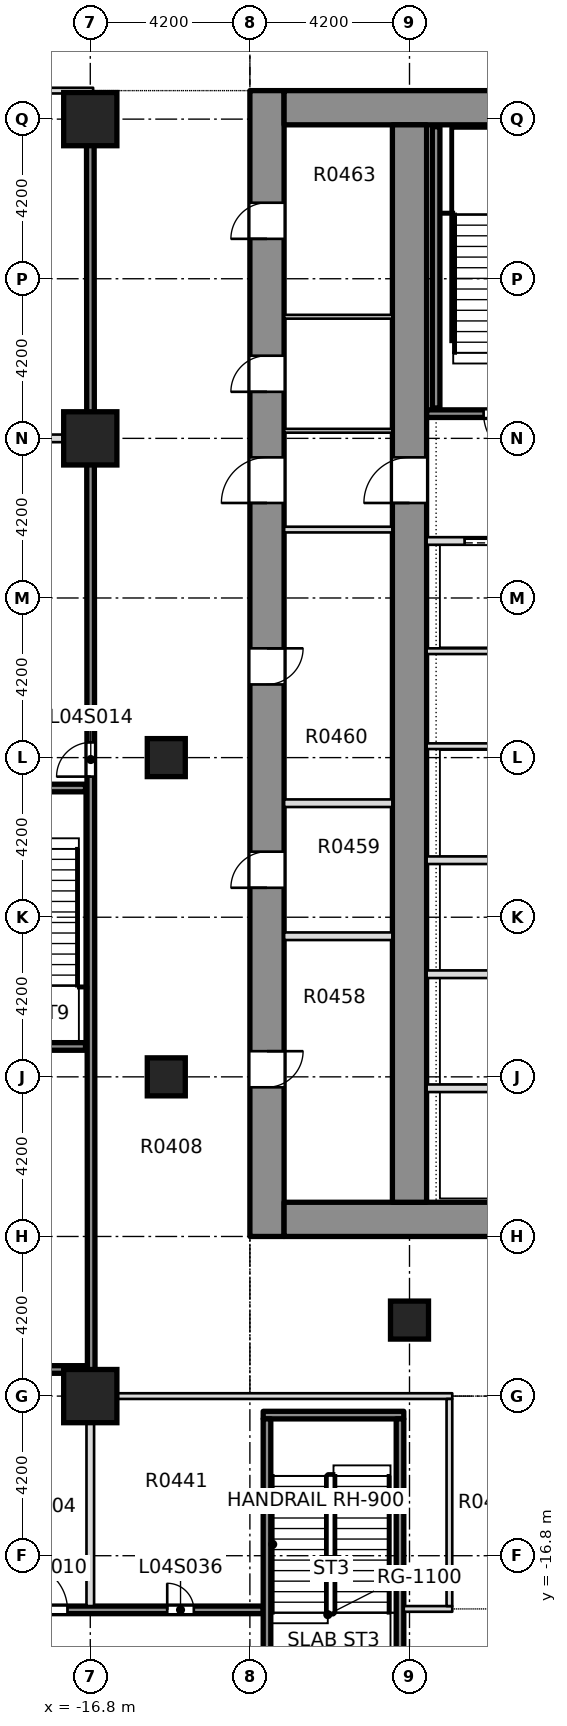
"""IFC4 building model, lengths in metres.
Left out: names, types, materials, properties, quantities, classifications, styles, units other than length and angle.
Written with IfcOpenShell. Run it as: python <this file> out.ifc"""

import sys

from ifc_helpers import new_model, si_unit, direction, frame, frame_2d, origin, origin_2d, place, context, subcontext, project, spatial, rectangle, extrude, element, fill, save


model = new_model("IFC4")
c1 = context("Model", 3, precision=1e-05, world=origin(), true_north=direction((0.0, 1.0)))
c2 = subcontext(c1, "Body", "Model", "MODEL_VIEW")
j1 = project(units=[si_unit("LENGTHUNIT", "METRE"), si_unit("PLANEANGLEUNIT", "RADIAN")], contexts=[c1])
p1 = place(None, origin())
s1 = spatial("IfcSite", under=j1, at=p1, CompositionType="ELEMENT")
p2 = place(p1, origin())
s2 = spatial("IfcBuilding", under=s1, at=p2, CompositionType="ELEMENT")
p3 = place(p2, frame((0.0, 0.0, 25.0)))
s3 = spatial("IfcBuildingStorey", under=s2, at=p3, CompositionType="ELEMENT", Elevation=25.0)
p4 = place(p3, frame((-12.15, -8.4, -0.4), z_axis=(0.0, 0.0, 1.0), x_axis=(0.0, 1.0, 0.0)))
e1 = element("IfcWall", 1, at=p4, inside=s3, PredefinedType="SHEAR", context=c2, shape_type="SweptSolid", body=[
    extrude(rectangle(XDim=30.15, YDim=0.9, at=frame_2d((15.075, 0.0))), origin(), (0.0, 0.0, 1.0), 5.0),
])
p5 = place(p4, frame((3.925, 0.0, 0.4)))
e2 = element("IfcOpeningElement", 2, at=p5, cuts=e1, PredefinedType="OPENING", context=c2, shape_type="SweptSolid", body=[
    extrude(rectangle(XDim=0.95, YDim=2.1, at=frame_2d((0.475, 1.05))), frame((0.0, 0.46, 0.0), z_axis=(0.0, -1.0, 0.0), x_axis=(1.0, 0.0, 0.0)), (0.0, 0.0, 1.0), 0.92),
])
p6 = place(p4, frame((9.175, 0.0, 0.4)))
e3 = element("IfcOpeningElement", 3, at=p6, cuts=e1, PredefinedType="OPENING", context=c2, shape_type="SweptSolid", body=[
    extrude(rectangle(XDim=0.95, YDim=2.1, at=frame_2d((0.475, 1.05))), frame((0.0, 0.46, 0.0), z_axis=(0.0, -1.0, 0.0), x_axis=(1.0, 0.0, 0.0)), (0.0, 0.0, 1.0), 0.92),
])
p7 = place(p4, frame((14.525, 0.0, 0.4)))
e4 = element("IfcOpeningElement", 4, at=p7, cuts=e1, PredefinedType="OPENING", context=c2, shape_type="SweptSolid", body=[
    extrude(rectangle(XDim=0.95, YDim=2.1, at=frame_2d((0.475, 1.05))), frame((0.0, 0.46, 0.0), z_axis=(0.0, -1.0, 0.0), x_axis=(1.0, 0.0, 0.0)), (0.0, 0.0, 1.0), 0.92),
])
p8 = place(p4, frame((22.225, 0.0, 0.4)))
e5 = element("IfcOpeningElement", 5, at=p8, cuts=e1, PredefinedType="OPENING", context=c2, shape_type="SweptSolid", body=[
    extrude(rectangle(XDim=0.95, YDim=2.1, at=frame_2d((0.475, 1.05))), frame((0.0, 0.46, 0.0), z_axis=(0.0, -1.0, 0.0), x_axis=(1.0, 0.0, 0.0)), (0.0, 0.0, 1.0), 0.92),
])
p9 = place(p4, frame((26.25, 0.0, 0.4)))
e6 = element("IfcOpeningElement", 6, at=p9, cuts=e1, PredefinedType="OPENING", context=c2, shape_type="SweptSolid", body=[
    extrude(rectangle(XDim=0.95, YDim=2.1, at=frame_2d((0.475, 1.05))), frame((0.0, 0.46, 0.0), z_axis=(0.0, -1.0, 0.0), x_axis=(1.0, 0.0, 0.0)), (0.0, 0.0, 1.0), 0.92),
])
p10 = place(p4, frame((19.3, 0.0, 0.4)))
e7 = element("IfcOpeningElement", 7, at=p10, cuts=e1, PredefinedType="OPENING", context=c2, shape_type="SweptSolid", body=[
    extrude(rectangle(XDim=1.2, YDim=2.1, at=frame_2d((0.6, 1.05))), frame((0.0, 0.46, 0.0), z_axis=(0.0, -1.0, 0.0), x_axis=(1.0, 0.0, 0.0)), (0.0, 0.0, 1.0), 0.92),
])
p11 = place(p3, frame((-11.7, -7.95, -0.4), z_axis=(0.0, 0.0, 1.0), x_axis=(1.0, 0.0, 0.0)))
e8 = element("IfcWall", 8, at=p11, inside=s3, PredefinedType="SHEAR", context=c2, shape_type="SweptSolid", body=[
    extrude(rectangle(XDim=23.4, YDim=0.9, at=frame_2d((11.7, 0.0))), origin(), (0.0, 0.0, 1.0), 5.0),
])
p12 = place(p11, frame((6.95, 0.0, 0.4)))
e9 = element("IfcOpeningElement", 9, at=p12, cuts=e8, PredefinedType="OPENING", context=c2, shape_type="SweptSolid", body=[
    extrude(rectangle(XDim=1.8, YDim=2.1, at=frame_2d((0.9, 1.05))), frame((0.0, 0.46, 0.0), z_axis=(0.0, -1.0, 0.0), x_axis=(1.0, 0.0, 0.0)), (0.0, 0.0, 1.0), 0.92),
])
p13 = place(p11, frame((14.65, 0.0, 0.4)))
e10 = element("IfcOpeningElement", 10, at=p13, cuts=e8, PredefinedType="OPENING", context=c2, shape_type="SweptSolid", body=[
    extrude(rectangle(XDim=1.8, YDim=2.1, at=frame_2d((0.9, 1.05))), frame((0.0, 0.46, 0.0), z_axis=(0.0, -1.0, 0.0), x_axis=(1.0, 0.0, 0.0)), (0.0, 0.0, 1.0), 0.92),
])
p14 = place(p3, frame((-11.7, 21.3, -0.4), z_axis=(0.0, 0.0, 1.0), x_axis=(1.0, 0.0, 0.0)))
e11 = element("IfcWall", 11, at=p14, inside=s3, PredefinedType="SOLIDWALL", context=c2, shape_type="SweptSolid", body=[
    extrude(rectangle(XDim=23.4, YDim=0.9, at=frame_2d((11.7, 0.0))), origin(), (0.0, 0.0, 1.0), 5.0),
])
p15 = place(p3, frame((-8.4, -7.5, -0.4), z_axis=(0.0, 0.0, 1.0), x_axis=(0.0, 1.0, 0.0)))
e12 = element("IfcWall", 12, at=p15, inside=s3, PredefinedType="SHEAR", context=c2, shape_type="SweptSolid", body=[
    extrude(rectangle(XDim=28.35, YDim=0.9, at=frame_2d((14.175, 0.0))), origin(), (0.0, 0.0, 1.0), 5.0),
])
p16 = place(p15, frame((18.4, 0.0, 0.4)))
e13 = element("IfcOpeningElement", 13, at=p16, cuts=e12, PredefinedType="OPENING", context=c2, shape_type="SweptSolid", body=[
    extrude(rectangle(XDim=1.2, YDim=2.1, at=frame_2d((0.6, 1.05))), frame((0.0, 0.46, 0.0), z_axis=(0.0, -1.0, 0.0), x_axis=(1.0, 0.0, 0.0)), (0.0, 0.0, 1.0), 0.92),
])
for number, where, z_axis, x_axis in (
    (14, (-16.8, -12.6, -0.4), (0.0, 0.0, 1.0), (1.0, 0.0, 0.0)),
    (15, (-16.8, 12.6, -0.4), (0.0, 0.0, 1.0), (1.0, 0.0, 0.0)),
    (16, (-16.8, 21.0, -0.4), (0.0, 0.0, 1.0), (1.0, 0.0, 0.0)),
):
    element("IfcColumn", number, at=place(p3, frame(where, z_axis=z_axis, x_axis=x_axis)), inside=s3, PredefinedType="COLUMN", context=c2, shape_type="SweptSolid", body=[
        extrude(rectangle(XDim=1.4, YDim=1.4, at=origin_2d()), origin(), (0.0, 0.0, 1.0), 5.0),
    ])
for number, where, z_axis, x_axis in (
    (17, (-8.4, -10.6, -0.4), (0.0, 0.0, 1.0), (1.0, 0.0, 0.0)),
    (18, (-14.8, -4.2, -0.4), (0.0, 0.0, 1.0), (1.0, 0.0, 0.0)),
    (19, (-14.8, 4.2, -0.4), (0.0, 0.0, 1.0), (1.0, 0.0, 0.0)),
):
    element("IfcColumn", number, at=place(p3, frame(where, z_axis=z_axis, x_axis=x_axis)), inside=s3, PredefinedType="COLUMN", context=c2, shape_type="SweptSolid", body=[
        extrude(rectangle(XDim=1.0, YDim=1.0, at=origin_2d()), origin(), (0.0, 0.0, 1.0), 5.0),
    ])
p17 = place(p3, frame((-25.2, -18.225, 0.0), z_axis=(0.0, 0.0, 1.0), x_axis=(1.0, 0.0, 0.0)))
e20 = element("IfcWall", 20, at=p17, inside=s3, PredefinedType="SOLIDWALL", context=c2, shape_type="SweptSolid", body=[
    extrude(rectangle(XDim=12.95, YDim=0.2, at=frame_2d((6.475, 0.0))), origin(), (0.0, 0.0, 1.0), 4.6),
])
p18 = place(p17, frame((6.6, 0.0, 0.0)))
e21 = element("IfcOpeningElement", 21, at=p18, cuts=e20, PredefinedType="OPENING", context=c2, shape_type="SweptSolid", body=[
    extrude(rectangle(XDim=1.2, YDim=2.1, at=frame_2d((0.6, 1.05))), frame((0.0, 0.11, 0.0), z_axis=(0.0, -1.0, 0.0), x_axis=(1.0, 0.0, 0.0)), (0.0, 0.0, 1.0), 0.22),
])
p19 = place(p17, frame((10.425, 0.0, 0.0)))
e22 = element("IfcOpeningElement", 22, at=p19, cuts=e20, PredefinedType="OPENING", context=c2, shape_type="SweptSolid", body=[
    extrude(rectangle(XDim=0.7, YDim=2.1, at=frame_2d((0.35, 1.05))), frame((0.0, 0.11, 0.0), z_axis=(0.0, -1.0, 0.0), x_axis=(1.0, 0.0, 0.0)), (0.0, 0.0, 1.0), 0.22),
])
p20 = place(p3, frame((-8.55, -18.2, 0.0), z_axis=(0.0, 0.0, 1.0), x_axis=(1.0, 0.0, 0.0)))
e23 = element("IfcWall", 23, at=p20, inside=s3, PredefinedType="PARTITIONING", context=c2, shape_type="SweptSolid", body=[
    extrude(rectangle(XDim=1.275, YDim=0.15, at=frame_2d((0.638, 0.0))), origin(), (0.0, 0.0, 1.0), 4.6),
])
p21 = place(p3, frame((-16.9, -12.6, 0.0), z_axis=(0.0, 0.0, 1.0), x_axis=(1.0, 0.0, 0.0)))
e24 = element("IfcWall", 24, at=p21, inside=s3, PredefinedType="PARTITIONING", context=c2, shape_type="SweptSolid", body=[
    extrude(rectangle(XDim=9.625, YDim=0.15, at=frame_2d((4.812, 0.0))), origin(), (0.0, 0.0, 1.0), 4.6),
])
p22 = place(p3, frame((-25.2, -11.9, 0.0), z_axis=(0.0, 0.0, 1.0), x_axis=(1.0, 0.0, 0.0)))
e25 = element("IfcWall", 25, at=p22, inside=s3, PredefinedType="SOLIDWALL", context=c2, shape_type="SweptSolid", body=[
    extrude(rectangle(XDim=8.325, YDim=0.2, at=frame_2d((4.163, 0.0))), origin(), (0.0, 0.0, 1.0), 4.6),
])
p23 = place(p3, frame((-25.75, 12.6, 0.0), z_axis=(0.0, 0.0, 1.0), x_axis=(1.0, 0.0, 0.0)))
e26 = element("IfcWall", 26, at=p23, inside=s3, PredefinedType="PARTITIONING", context=c2, shape_type="SweptSolid", body=[
    extrude(rectangle(XDim=8.875, YDim=0.2, at=frame_2d((4.438, 0.0))), origin(), (0.0, 0.0, 1.0), 4.6),
])
p24 = place(p23, frame((1.738, 0.0, 0.0)))
e27 = element("IfcOpeningElement", 27, at=p24, cuts=e26, PredefinedType="OPENING", context=c2, shape_type="SweptSolid", body=[
    extrude(rectangle(XDim=0.9, YDim=2.1, at=frame_2d((0.45, 1.05))), frame((0.0, 0.11, 0.0), z_axis=(0.0, -1.0, 0.0), x_axis=(1.0, 0.0, 0.0)), (0.0, 0.0, 1.0), 0.22),
])
p25 = place(p23, frame((6.175, 0.0, 0.0)))
e28 = element("IfcOpeningElement", 28, at=p25, cuts=e26, PredefinedType="OPENING", context=c2, shape_type="SweptSolid", body=[
    extrude(rectangle(XDim=0.9, YDim=2.1, at=frame_2d((0.45, 1.05))), frame((0.0, 0.11, 0.0), z_axis=(0.0, -1.0, 0.0), x_axis=(1.0, 0.0, 0.0)), (0.0, 0.0, 1.0), 0.22),
])
p26 = place(p3, frame((-25.75, 21.75, 0.0), z_axis=(0.0, 0.0, 1.0), x_axis=(1.0, 0.0, 0.0)))
e29 = element("IfcWall", 29, at=p26, inside=s3, PredefinedType="PARTITIONING", context=c2, shape_type="SweptSolid", body=[
    extrude(rectangle(XDim=9.025, YDim=0.15, at=frame_2d((4.512, 0.0))), origin(), (0.0, 0.0, 1.0), 4.6),
])
p27 = place(p3, frame((-16.8, -18.125, 0.0), z_axis=(0.0, 0.0, 1.0), x_axis=(0.0, 1.0, 0.0)))
e30 = element("IfcWall", 30, at=p27, inside=s3, PredefinedType="PARTITIONING", context=c2, shape_type="SweptSolid", body=[
    extrude(rectangle(XDim=5.45, YDim=0.2, at=frame_2d((2.725, 0.0))), origin(), (0.0, 0.0, 1.0), 4.6),
])
p28 = place(p3, frame((-16.775, -12.525, 0.0), z_axis=(0.0, 0.0, 1.0), x_axis=(-0.000727609751, 0.999999735292, 0.0)))
e31 = element("IfcWall", 31, at=p28, inside=s3, PredefinedType="SOLIDWALL", context=c2, shape_type="SweptSolid", body=[
    extrude(rectangle(XDim=34.225, YDim=0.2, at=frame_2d((17.112, 0.0))), origin(), (0.0, 0.0, 1.0), 4.6),
])
p29 = place(p28, frame((16.225, 0.0, 0.0)))
e32 = element("IfcOpeningElement", 32, at=p29, cuts=e31, PredefinedType="OPENING", context=c2, shape_type="SweptSolid", body=[
    extrude(rectangle(XDim=0.9, YDim=2.1, at=frame_2d((0.45, 1.05))), frame((0.0, 0.11, 0.0), z_axis=(0.0, -1.0, 0.0), x_axis=(1.0, 0.0, 0.0)), (0.0, 0.0, 1.0), 0.22),
])
p30 = place(p3, frame((-7.35, -18.125, 0.0), z_axis=(0.0, 0.0, 1.0), x_axis=(0.0, 1.0, 0.0)))
e33 = element("IfcWall", 33, at=p30, inside=s3, PredefinedType="PARTITIONING", context=c2, shape_type="SweptSolid", body=[
    extrude(rectangle(XDim=5.45, YDim=0.15, at=frame_2d((2.725, 0.0))), origin(), (0.0, 0.0, 1.0), 4.6),
])
for number, where, z_axis, x_axis in (
    (34, (-7.949, -4.5, 0.0), (0.0, 0.0, 1.0), (1.0, 0.0, 0.0)),
    (35, (-7.949, -1.5, 0.0), (0.0, 0.0, 1.0), (1.0, 0.0, 0.0)),
    (36, (-7.949, 1.5, 0.0), (0.0, 0.0, 1.0), (1.0, 0.0, 0.0)),
):
    element("IfcWall", number, at=place(p3, frame(where, z_axis=z_axis, x_axis=x_axis)), inside=s3, PredefinedType="PARTITIONING", context=c2, shape_type="SweptSolid", body=[
        extrude(rectangle(XDim=2.374, YDim=0.2, at=frame_2d((1.187, 0.0))), origin(), (0.0, 0.0, 1.0), 4.6),
    ])
p31 = place(p3, frame((-7.949, 4.5, 0.0), z_axis=(0.0, 0.0, 1.0), x_axis=(1.0, 0.0, 0.0)))
e37 = element("IfcWall", 37, at=p31, inside=s3, PredefinedType="PARTITIONING", context=c2, shape_type="SweptSolid", body=[
    extrude(rectangle(XDim=2.524, YDim=0.15, at=frame_2d((1.262, 0.0))), origin(), (0.0, 0.0, 1.0), 4.6),
])
p32 = place(p3, frame((-7.949, 7.0, 0.0), z_axis=(0.0, 0.0, 1.0), x_axis=(1.0, 0.0, 0.0)))
e38 = element("IfcWall", 38, at=p32, inside=s3, PredefinedType="PARTITIONING", context=c2, shape_type="SweptSolid", body=[
    extrude(rectangle(XDim=15.898, YDim=0.15, at=frame_2d((7.949, 0.0))), origin(), (0.0, 0.0, 1.0), 4.6),
])
p33 = place(p32, frame((7.249, 0.0, 0.0)))
e39 = element("IfcOpeningElement", 39, at=p33, cuts=e38, PredefinedType="OPENING", context=c2, shape_type="SweptSolid", body=[
    extrude(rectangle(XDim=1.4, YDim=2.1, at=frame_2d((0.7, 1.05))), frame((0.0, 0.085, 0.0), z_axis=(0.0, -1.0, 0.0), x_axis=(1.0, 0.0, 0.0)), (0.0, 0.0, 1.0), 0.17),
])
p34 = place(p3, frame((-7.949, 9.9, 0.0), z_axis=(0.0, 0.0, 1.0), x_axis=(1.0, 0.0, 0.0)))
e40 = element("IfcWall", 40, at=p34, inside=s3, PredefinedType="PARTITIONING", context=c2, shape_type="SweptSolid", body=[
    extrude(rectangle(XDim=4.349, YDim=0.2, at=frame_2d((2.174, 0.0))), origin(), (0.0, 0.0, 1.0), 4.6),
])
p35 = place(p34, frame((0.999, 0.0, 0.0)))
e41 = element("IfcOpeningElement", 41, at=p35, cuts=e40, PredefinedType="OPENING", context=c2, shape_type="SweptSolid", body=[
    extrude(rectangle(XDim=1.1, YDim=2.1, at=frame_2d((0.55, 1.05))), frame((0.0, 0.11, 0.0), z_axis=(0.0, -1.0, 0.0), x_axis=(1.0, 0.0, 0.0)), (0.0, 0.0, 1.0), 0.22),
])
p36 = place(p3, frame((-7.949, 13.25, 0.0), z_axis=(0.0, 0.0, 1.0), x_axis=(1.0, 0.0, 0.0)))
e42 = element("IfcWall", 42, at=p36, inside=s3, PredefinedType="SOLIDWALL", context=c2, shape_type="SweptSolid", body=[
    extrude(rectangle(XDim=4.524, YDim=0.2, at=frame_2d((2.262, 0.0))), origin(), (0.0, 0.0, 1.0), 4.6),
])
p37 = place(p36, frame((1.499, 0.0, 0.0)))
e43 = element("IfcOpeningElement", 43, at=p37, cuts=e42, PredefinedType="OPENING", context=c2, shape_type="SweptSolid", body=[
    extrude(rectangle(XDim=1.2, YDim=2.1, at=frame_2d((0.6, 1.05))), frame((0.0, 0.11, 0.0), z_axis=(0.0, -1.0, 0.0), x_axis=(1.0, 0.0, 0.0)), (0.0, 0.0, 1.0), 0.22),
])
for number, where, z_axis, x_axis in (
    (44, (-11.699, -0.5, 0.0), (0.0, 0.0, 1.0), (1.0, 0.0, 0.0)),
    (45, (-11.699, 3.0, 0.0), (0.0, 0.0, 1.0), (1.0, 0.0, 0.0)),
):
    element("IfcWall", number, at=place(p3, frame(where, z_axis=z_axis, x_axis=x_axis)), inside=s3, PredefinedType="PARTITIONING", context=c2, shape_type="SweptSolid", body=[
        extrude(rectangle(XDim=2.848, YDim=0.2, at=frame_2d((1.424, 0.0))), origin(), (0.0, 0.0, 1.0), 4.6),
    ])
p38 = place(p3, frame((-11.699, 10.2, 0.0), z_axis=(0.0, 0.0, 1.0), x_axis=(1.0, 0.0, 0.0)))
e46 = element("IfcWall", 46, at=p38, inside=s3, PredefinedType="PARTITIONING", context=c2, shape_type="SweptSolid", body=[
    extrude(rectangle(XDim=2.848, YDim=0.15, at=frame_2d((1.424, 0.0))), origin(), (0.0, 0.0, 1.0), 4.6),
])
for number, where, z_axis, x_axis in (
    (47, (-11.699, 12.8, 0.0), (0.0, 0.0, 1.0), (1.0, 0.0, 0.0)),
    (48, (-11.699, 15.8, 0.0), (0.0, 0.0, 1.0), (1.0, 0.0, 0.0)),
):
    element("IfcWall", number, at=place(p3, frame(where, z_axis=z_axis, x_axis=x_axis)), inside=s3, PredefinedType="PARTITIONING", context=c2, shape_type="SweptSolid", body=[
        extrude(rectangle(XDim=2.848, YDim=0.1, at=frame_2d((1.424, 0.0))), origin(), (0.0, 0.0, 1.0), 4.6),
    ])
p39 = place(p3, frame((-12.25, -13.1, 0.0), z_axis=(0.0, 0.0, 1.0), x_axis=(1.0, 0.0, 0.0)))
e49 = element("IfcWall", 49, at=p39, inside=s3, PredefinedType="SOLIDWALL", context=c2, shape_type="SweptSolid", body=[
    extrude(rectangle(XDim=3.7, YDim=0.2, at=frame_2d((1.85, 0.0))), origin(), (0.0, 0.0, 1.0), 4.6),
])
p40 = place(p3, frame((-12.15, -19.8, 0.0), z_axis=(0.0, 0.0, 1.0), x_axis=(0.0, 1.0, 0.0)))
e50 = element("IfcWall", 50, at=p40, inside=s3, PredefinedType="SOLIDWALL", context=c2, shape_type="SweptSolid", body=[
    extrude(rectangle(XDim=6.6, YDim=0.2, at=frame_2d((3.3, 0.0))), origin(), (0.0, 0.0, 1.0), 4.6),
])
p41 = place(p3, frame((-8.65, -20.3, 0.0), z_axis=(0.0, 0.0, 1.0), x_axis=(0.0, 1.0, 0.0)))
e51 = element("IfcWall", 51, at=p41, inside=s3, PredefinedType="SOLIDWALL", context=c2, shape_type="SweptSolid", body=[
    extrude(rectangle(XDim=7.1, YDim=0.2, at=frame_2d((3.55, 0.0))), origin(), (0.0, 0.0, 1.0), 4.6),
])
for number, where, z_axis, x_axis in (
    (52, (-20.45, -3.4, 0.0), (0.0, 0.0, 1.0), (1.0, 0.0, 0.0)),
    (53, (-20.45, 3.4, 0.0), (0.0, 0.0, 1.0), (1.0, 0.0, 0.0)),
):
    element("IfcWall", number, at=place(p3, frame(where, z_axis=z_axis, x_axis=x_axis)), inside=s3, PredefinedType="SOLIDWALL", context=c2, shape_type="SweptSolid", body=[
        extrude(rectangle(XDim=3.525, YDim=0.2, at=frame_2d((1.762, 0.0))), origin(), (0.0, 0.0, 1.0), 4.6),
    ])
p42 = place(p3, frame((-7.7, 13.4, 0.0), z_axis=(0.0, 0.0, 1.0), x_axis=(0.0, 1.0, 0.0)))
e54 = element("IfcWall", 54, at=p42, inside=s3, PredefinedType="SOLIDWALL", context=c2, shape_type="SweptSolid", body=[
    extrude(rectangle(XDim=7.4, YDim=0.2, at=frame_2d((3.7, 0.0))), origin(), (0.0, 0.0, 1.0), 4.6),
])
p43 = place(p18, origin())
e55 = element("IfcDoor", 55, at=p43, inside=s3, OperationType="SINGLE_SWING_RIGHT", PredefinedType="DOOR", context=c2, shape_type="SweptSolid", body=[
    extrude(rectangle(XDim=1.2, YDim=2.1, at=frame_2d((0.6, 1.05))), frame((0.0, 0.025, 0.0), z_axis=(0.0, -1.0, 0.0), x_axis=(1.0, 0.0, 0.0)), (0.0, 0.0, 1.0), 0.05),
])
fill(e21, e55)
p44 = place(p29, origin())
e56 = element("IfcDoor", 56, at=p44, inside=s3, OperationType="SINGLE_SWING_LEFT", PredefinedType="DOOR", context=c2, shape_type="SweptSolid", body=[
    extrude(rectangle(XDim=0.9, YDim=2.1, at=frame_2d((0.45, 1.05))), frame((0.0, 0.025, 0.0), z_axis=(0.0, -1.0, 0.0), x_axis=(1.0, 0.0, 0.0)), (0.0, 0.0, 1.0), 0.05),
])
fill(e32, e56)
p45 = place(p19, origin())
e57 = element("IfcDoor", 57, at=p45, inside=s3, OperationType="SINGLE_SWING_RIGHT", PredefinedType="DOOR", context=c2, shape_type="SweptSolid", body=[
    extrude(rectangle(XDim=0.7, YDim=2.1, at=frame_2d((0.35, 1.05))), frame((0.0, 0.025, 0.0), z_axis=(0.0, -1.0, 0.0), x_axis=(1.0, 0.0, 0.0)), (0.0, 0.0, 1.0), 0.05),
])
fill(e22, e57)
p46 = place(p37, origin())
e58 = element("IfcDoor", 58, at=p46, inside=s3, OperationType="SINGLE_SWING_LEFT", PredefinedType="DOOR", context=c2, shape_type="SweptSolid", body=[
    extrude(rectangle(XDim=1.2, YDim=2.1, at=frame_2d((0.6, 1.05))), frame((0.0, 0.025, 0.0), z_axis=(0.0, -1.0, 0.0), x_axis=(1.0, 0.0, 0.0)), (0.0, 0.0, 1.0), 0.05),
])
fill(e43, e58)
p47 = place(p35, origin())
e59 = element("IfcDoor", 59, at=p47, inside=s3, OperationType="SLIDING_TO_RIGHT", PredefinedType="DOOR", context=c2, shape_type="SweptSolid", body=[
    extrude(rectangle(XDim=1.1, YDim=2.1, at=frame_2d((0.55, 1.05))), frame((0.0, 0.025, 0.0), z_axis=(0.0, -1.0, 0.0), x_axis=(1.0, 0.0, 0.0)), (0.0, 0.0, 1.0), 0.05),
])
fill(e41, e59)
p48 = place(p5, origin())
e60 = element("IfcDoor", 60, at=p48, inside=s3, OperationType="SINGLE_SWING_LEFT", PredefinedType="DOOR", context=c2, shape_type="SweptSolid", body=[
    extrude(rectangle(XDim=0.95, YDim=2.1, at=frame_2d((0.475, 1.05))), frame((0.0, 0.025, 0.0), z_axis=(0.0, -1.0, 0.0), x_axis=(1.0, 0.0, 0.0)), (0.0, 0.0, 1.0), 0.05),
])
fill(e2, e60)
p49 = place(p6, origin())
e61 = element("IfcDoor", 61, at=p49, inside=s3, OperationType="SINGLE_SWING_LEFT", PredefinedType="DOOR", context=c2, shape_type="SweptSolid", body=[
    extrude(rectangle(XDim=0.95, YDim=2.1, at=frame_2d((0.475, 1.05))), frame((0.0, 0.025, 0.0), z_axis=(0.0, -1.0, 0.0), x_axis=(1.0, 0.0, 0.0)), (0.0, 0.0, 1.0), 0.05),
])
fill(e3, e61)
p50 = place(p7, origin())
e62 = element("IfcDoor", 62, at=p50, inside=s3, OperationType="SINGLE_SWING_LEFT", PredefinedType="DOOR", context=c2, shape_type="SweptSolid", body=[
    extrude(rectangle(XDim=0.95, YDim=2.1, at=frame_2d((0.475, 1.05))), frame((0.0, 0.025, 0.0), z_axis=(0.0, -1.0, 0.0), x_axis=(1.0, 0.0, 0.0)), (0.0, 0.0, 1.0), 0.05),
])
fill(e4, e62)
p51 = place(p8, origin())
e63 = element("IfcDoor", 63, at=p51, inside=s3, OperationType="SINGLE_SWING_LEFT", PredefinedType="DOOR", context=c2, shape_type="SweptSolid", body=[
    extrude(rectangle(XDim=0.95, YDim=2.1, at=frame_2d((0.475, 1.05))), frame((0.0, 0.025, 0.0), z_axis=(0.0, -1.0, 0.0), x_axis=(1.0, 0.0, 0.0)), (0.0, 0.0, 1.0), 0.05),
])
fill(e5, e63)
p52 = place(p9, origin())
e64 = element("IfcDoor", 64, at=p52, inside=s3, OperationType="SINGLE_SWING_LEFT", PredefinedType="DOOR", context=c2, shape_type="SweptSolid", body=[
    extrude(rectangle(XDim=0.95, YDim=2.1, at=frame_2d((0.475, 1.05))), frame((0.0, 0.025, 0.0), z_axis=(0.0, -1.0, 0.0), x_axis=(1.0, 0.0, 0.0)), (0.0, 0.0, 1.0), 0.05),
])
fill(e6, e64)
p53 = place(p10, origin())
e65 = element("IfcDoor", 65, at=p53, inside=s3, OperationType="SINGLE_SWING_LEFT", PredefinedType="DOOR", context=c2, shape_type="SweptSolid", body=[
    extrude(rectangle(XDim=1.2, YDim=2.1, at=frame_2d((0.6, 1.05))), frame((0.0, 0.025, 0.0), z_axis=(0.0, -1.0, 0.0), x_axis=(1.0, 0.0, 0.0)), (0.0, 0.0, 1.0), 0.05),
])
fill(e7, e65)
p54 = place(p16, origin())
e66 = element("IfcDoor", 66, at=p54, inside=s3, OperationType="SINGLE_SWING_LEFT", PredefinedType="DOOR", context=c2, shape_type="SweptSolid", body=[
    extrude(rectangle(XDim=1.2, YDim=2.1, at=frame_2d((0.6, 1.05))), frame((0.0, 0.025, 0.0), z_axis=(0.0, -1.0, 0.0), x_axis=(1.0, 0.0, 0.0)), (0.0, 0.0, 1.0), 0.05),
])
fill(e13, e66)
save(model, sys.argv[1])
